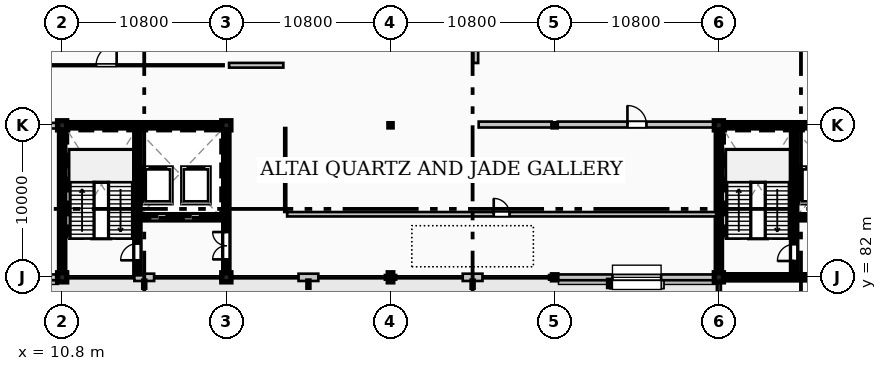
"""IFC4 building model, lengths in metres.
Left out: names, types, materials, properties, quantities, classifications, styles, units other than length and angle.
Written with IfcOpenShell. Run it as: python <this file> out.ifc"""

import sys

from ifc_helpers import new_model, si_unit, direction, frame, frame_2d, origin, origin_2d, place, context, subcontext, project, spatial, rectangle, hollow_rectangle, i_section, extrude, element, fill, save


model = new_model("IFC4")
c1 = context("Model", 3, precision=1e-05, world=origin(), true_north=direction((0.0, 1.0)))
c2 = subcontext(c1, "Body", "Model", "MODEL_VIEW")
j1 = project(units=[si_unit("LENGTHUNIT", "METRE"), si_unit("PLANEANGLEUNIT", "RADIAN")], contexts=[c1])
p1 = place(None, origin())
s1 = spatial("IfcSite", under=j1, at=p1, CompositionType="ELEMENT")
p2 = place(p1, origin())
s2 = spatial("IfcBuilding", under=s1, at=p2, CompositionType="ELEMENT")
p3 = place(p2, frame((0.0, 0.0, 24.0)))
s3 = spatial("IfcBuildingStorey", under=s2, at=p3, CompositionType="ELEMENT", Elevation=24.0)
for number, where, z_axis, x_axis in (
    (1, (10.8, 82.0, 0.0), (0.0, 0.0, 1.0), (1.0, 0.0, 0.0)),
    (2, (10.8, 92.0, 0.0), (0.0, 0.0, 1.0), (1.0, 0.0, 0.0)),
    (3, (21.6, 82.0, 0.0), (0.0, 0.0, 1.0), (1.0, 0.0, 0.0)),
    (4, (21.6, 92.0, 0.0), (0.0, 0.0, 1.0), (1.0, 0.0, 0.0)),
):
    element("IfcColumn", number, at=place(p3, frame(where, z_axis=z_axis, x_axis=x_axis)), inside=s3, PredefinedType="COLUMN", context=c2, shape_type="SweptSolid", body=[
        extrude(rectangle(XDim=0.6, YDim=0.6, at=origin_2d()), origin(), (0.0, 0.0, 1.0), 4.8),
    ])
p4 = place(p3, frame((32.4, 82.0, 0.0), z_axis=(0.0, 0.0, 1.0), x_axis=(1.0, 0.0, 0.0)))
e5 = element("IfcColumn", 5, at=p4, inside=s3, PredefinedType="COLUMN", context=c2, shape_type="SweptSolid", body=[
    extrude(i_section(OverallWidth=0.3, OverallDepth=0.6, WebThickness=0.015, FlangeThickness=0.03, FilletRadius=0.027, at=origin_2d()), origin(), (0.0, 0.0, 1.0), 4.8),
])
p5 = place(p3, frame((32.4, 92.0, 0.0), z_axis=(0.0, 0.0, 1.0), x_axis=(1.0, 0.0, 0.0)))
e6 = element("IfcColumn", 6, at=p5, inside=s3, PredefinedType="COLUMN", context=c2, shape_type="SweptSolid", body=[
    extrude(hollow_rectangle(XDim=0.22, YDim=0.22, WallThickness=0.012, InnerFilletRadius=0.012, OuterFilletRadius=0.025, at=origin_2d()), origin(), (0.0, 0.0, 1.0), 4.8),
])
p6 = place(p3, frame((43.2, 82.0, 0.0), z_axis=(0.0, 0.0, 1.0), x_axis=(1.0, 0.0, 0.0)))
e7 = element("IfcColumn", 7, at=p6, inside=s3, PredefinedType="COLUMN", context=c2, shape_type="SweptSolid", body=[
    extrude(i_section(OverallWidth=0.3, OverallDepth=0.34, WebThickness=0.012, FlangeThickness=0.021, FilletRadius=0.027, at=origin_2d()), origin(), (0.0, 0.0, 1.0), 4.8),
])
p7 = place(p3, frame((43.2, 92.0, 0.0), z_axis=(0.0, 0.0, 1.0), x_axis=(1.0, 0.0, 0.0)))
e8 = element("IfcColumn", 8, at=p7, inside=s3, PredefinedType="COLUMN", context=c2, shape_type="SweptSolid", body=[
    extrude(hollow_rectangle(XDim=0.22, YDim=0.22, WallThickness=0.012, InnerFilletRadius=0.012, OuterFilletRadius=0.025, at=origin_2d()), origin(), (0.0, 0.0, 1.0), 4.8),
])
for number, where, z_axis, x_axis in (
    (9, (54.0, 82.0, 0.0), (0.0, 0.0, 1.0), (1.0, 0.0, 0.0)),
    (10, (54.0, 92.0, 0.0), (0.0, 0.0, 1.0), (1.0, 0.0, 0.0)),
):
    element("IfcColumn", number, at=place(p3, frame(where, z_axis=z_axis, x_axis=x_axis)), inside=s3, PredefinedType="COLUMN", context=c2, shape_type="SweptSolid", body=[
        extrude(rectangle(XDim=0.6, YDim=0.6, at=origin_2d()), origin(), (0.0, 0.0, 1.0), 4.8),
    ])
p8 = place(p3, frame((0.145, 82.0, 0.0), z_axis=(0.0, 0.0, 1.0), x_axis=(1.0, 0.0, 0.0)))
e11 = element("IfcWall", 11, at=p8, inside=s3, PredefinedType="STANDARD", context=c2, shape_type="SweptSolid", body=[
    extrude(rectangle(XDim=10.51, YDim=0.38, at=frame_2d((5.255, 0.0))), origin(), (0.0, 0.0, 1.0), 4.17),
])
p9 = place(p8, frame((3.805, 0.0, 1.0)))
e12 = element("IfcOpeningElement", 12, at=p9, cuts=e11, PredefinedType="OPENING", context=c2, shape_type="SweptSolid", body=[
    extrude(rectangle(XDim=2.9, YDim=2.5, at=frame_2d((1.45, 1.25))), frame((0.0, 0.2, 0.0), z_axis=(0.0, -1.0, 0.0), x_axis=(1.0, 0.0, 0.0)), (0.0, 0.0, 1.0), 0.4),
])
p10 = place(p3, frame((15.55, 82.0, 0.0), z_axis=(0.0, 0.0, 1.0), x_axis=(1.0, 0.0, 0.0)))
e13 = element("IfcWall", 13, at=p10, inside=s3, PredefinedType="STANDARD", context=c2, shape_type="SweptSolid", body=[
    extrude(rectangle(XDim=1.3, YDim=0.48, at=frame_2d((0.65, 0.0))), origin(), (0.0, 0.0, 1.0), 4.17),
])
p11 = place(p3, frame((10.945, 82.0, 0.0), z_axis=(0.0, 0.0, 1.0), x_axis=(1.0, 0.0, 0.0)))
e14 = element("IfcWall", 14, at=p11, inside=s3, PredefinedType="STANDARD", context=c2, shape_type="SweptSolid", body=[
    extrude(rectangle(XDim=0.225, YDim=0.3, at=frame_2d((0.112, 0.0))), origin(), (0.0, 0.0, 1.0), 4.56),
])
p12 = place(p3, frame((21.23, 82.0, 0.0), z_axis=(0.0, 0.0, 1.0), x_axis=(1.0, 0.0, 0.0)))
e15 = element("IfcWall", 15, at=p12, inside=s3, PredefinedType="STANDARD", context=c2, shape_type="SweptSolid", body=[
    extrude(rectangle(XDim=0.225, YDim=0.3, at=frame_2d((0.113, 0.0))), origin(), (0.0, 0.0, 1.0), 4.56),
])
p13 = place(p3, frame((26.35, 82.0, 0.0), z_axis=(0.0, 0.0, 1.0), x_axis=(1.0, 0.0, 0.0)))
e16 = element("IfcWall", 16, at=p13, inside=s3, PredefinedType="STANDARD", context=c2, shape_type="SweptSolid", body=[
    extrude(rectangle(XDim=1.3, YDim=0.48, at=frame_2d((0.65, 0.0))), origin(), (0.0, 0.0, 1.0), 4.17),
])
for number, where, z_axis, x_axis in (
    (17, (21.745, 82.0, 0.0), (0.0, 0.0, 1.0), (1.0, 0.0, 0.0)),
    (18, (32.03, 82.0, 0.0), (0.0, 0.0, 1.0), (1.0, 0.0, 0.0)),
):
    element("IfcWall", number, at=place(p3, frame(where, z_axis=z_axis, x_axis=x_axis)), inside=s3, PredefinedType="STANDARD", context=c2, shape_type="SweptSolid", body=[
        extrude(rectangle(XDim=0.225, YDim=0.3, at=frame_2d((0.112, 0.0))), origin(), (0.0, 0.0, 1.0), 4.56),
    ])
p14 = place(p3, frame((37.15, 82.0, 0.0), z_axis=(0.0, 0.0, 1.0), x_axis=(1.0, 0.0, 0.0)))
e19 = element("IfcWall", 19, at=p14, inside=s3, PredefinedType="STANDARD", context=c2, shape_type="SweptSolid", body=[
    extrude(rectangle(XDim=1.3, YDim=0.48, at=frame_2d((0.65, 0.0))), origin(), (0.0, 0.0, 1.0), 4.17),
])
p15 = place(p3, frame((32.545, 82.0, 0.0), z_axis=(0.0, 0.0, 1.0), x_axis=(1.0, 0.0, 0.0)))
e20 = element("IfcWall", 20, at=p15, inside=s3, PredefinedType="STANDARD", context=c2, shape_type="SweptSolid", body=[
    extrude(rectangle(XDim=0.225, YDim=0.3, at=frame_2d((0.113, 0.0))), origin(), (0.0, 0.0, 1.0), 4.56),
])
p16 = place(p3, frame((42.83, 82.0, 0.0), z_axis=(0.0, 0.0, 1.0), x_axis=(1.0, 0.0, 0.0)))
e21 = element("IfcWall", 21, at=p16, inside=s3, PredefinedType="STANDARD", context=c2, shape_type="SweptSolid", body=[
    extrude(rectangle(XDim=0.225, YDim=0.3, at=frame_2d((0.112, 0.0))), origin(), (0.0, 0.0, 1.0), 4.56),
])
p17 = place(p3, frame((43.345, 82.0, 0.0), z_axis=(0.0, 0.0, 1.0), x_axis=(1.0, 0.0, 0.0)))
e22 = element("IfcWall", 22, at=p17, inside=s3, PredefinedType="STANDARD", context=c2, shape_type="SweptSolid", body=[
    extrude(rectangle(XDim=10.51, YDim=0.38, at=frame_2d((5.255, 0.0))), origin(), (0.0, 0.0, 1.0), 4.17),
])
p18 = place(p17, frame((3.655, 0.0, 1.0)))
e23 = element("IfcOpeningElement", 23, at=p18, cuts=e22, PredefinedType="OPENING", context=c2, shape_type="SweptSolid", body=[
    extrude(rectangle(XDim=3.2, YDim=2.5, at=frame_2d((1.6, 1.25))), frame((0.0, 0.2, 0.0), z_axis=(0.0, -1.0, 0.0), x_axis=(1.0, 0.0, 0.0)), (0.0, 0.0, 1.0), 0.4),
])
p19 = place(p3, frame((54.0, 81.855, 0.0), z_axis=(0.0, 0.0, 1.0), x_axis=(0.0, -1.0, 0.0)))
e24 = element("IfcWall", 24, at=p19, inside=s3, PredefinedType="STANDARD", context=c2, shape_type="SweptSolid", body=[
    extrude(rectangle(XDim=0.225, YDim=0.3, at=frame_2d((0.113, 0.0))), origin(), (0.0, 0.0, 1.0), 4.56),
])
p20 = place(p3, frame((54.0, 40.35, 4.6), z_axis=(0.0, 0.0, 1.0), x_axis=(0.0, 1.0, 0.0)))
e25 = element("IfcWall", 25, at=p20, inside=s3, PredefinedType="PARAPET", context=c2, shape_type="SweptSolid", body=[
    extrude(rectangle(XDim=41.3, YDim=0.26, at=frame_2d((20.65, 0.0))), origin(), (0.0, 0.0, 1.0), 0.55),
])
p21 = place(p3, frame((11.1, 92.0, 0.0), z_axis=(0.0, 0.0, 1.0), x_axis=(1.0, 0.0, 0.0)))
e26 = element("IfcWall", 26, at=p21, inside=s3, PredefinedType="SHEAR", context=c2, shape_type="SweptSolid", body=[
    extrude(rectangle(XDim=10.2, YDim=0.35, at=frame_2d((5.1, 0.0))), origin(), (0.0, 0.0, 1.0), 4.56),
])
p22 = place(p3, frame((10.8, 82.3, 0.0), z_axis=(0.0, 0.0, 1.0), x_axis=(0.0, 1.0, 0.0)))
e27 = element("IfcWall", 27, at=p22, inside=s3, PredefinedType="SHEAR", context=c2, shape_type="SweptSolid", body=[
    extrude(rectangle(XDim=9.4, YDim=0.35, at=frame_2d((4.7, 0.0))), origin(), (0.0, 0.0, 1.0), 4.56),
])
p23 = place(p3, frame((21.6, 82.3, 0.0), z_axis=(0.0, 0.0, 1.0), x_axis=(0.0, 1.0, 0.0)))
e28 = element("IfcWall", 28, at=p23, inside=s3, PredefinedType="SHEAR", context=c2, shape_type="SweptSolid", body=[
    extrude(rectangle(XDim=9.4, YDim=0.35, at=frame_2d((4.7, 0.0))), origin(), (0.0, 0.0, 1.0), 4.56),
])
p24 = place(p23, frame((0.88, 0.0, 0.0)))
e29 = element("IfcOpeningElement", 29, at=p24, cuts=e28, PredefinedType="OPENING", context=c2, shape_type="SweptSolid", body=[
    extrude(rectangle(XDim=1.8, YDim=2.25, at=frame_2d((0.9, 1.125))), frame((0.0, 0.185, 0.0), z_axis=(0.0, -1.0, 0.0), x_axis=(1.0, 0.0, 0.0)), (0.0, 0.0, 1.0), 0.37),
])
p25 = place(p3, frame((15.75, 82.22, 0.0), z_axis=(0.0, 0.0, 1.0), x_axis=(0.0, 1.0, 0.0)))
e30 = element("IfcWall", 30, at=p25, inside=s3, PredefinedType="SHEAR", context=c2, shape_type="SweptSolid", body=[
    extrude(rectangle(XDim=9.605, YDim=0.35, at=frame_2d((4.802, 0.0))), origin(), (0.0, 0.0, 1.0), 4.56),
])
p26 = place(p25, frame((0.9, 0.0, 0.0)))
e31 = element("IfcOpeningElement", 31, at=p26, cuts=e30, PredefinedType="OPENING", context=c2, shape_type="SweptSolid", body=[
    extrude(rectangle(XDim=1.1, YDim=2.2, at=frame_2d((0.55, 1.1))), frame((0.0, 0.185, 0.0), z_axis=(0.0, -1.0, 0.0), x_axis=(1.0, 0.0, 0.0)), (0.0, 0.0, 1.0), 0.37),
])
p27 = place(p3, frame((15.93, 85.95, 0.0), z_axis=(0.0, 0.0, 1.0), x_axis=(1.0, 0.0, 0.0)))
e32 = element("IfcWall", 32, at=p27, inside=s3, PredefinedType="SHEAR", context=c2, shape_type="SweptSolid", body=[
    extrude(rectangle(XDim=5.49, YDim=0.35, at=frame_2d((2.745, 0.0))), origin(), (0.0, 0.0, 1.0), 4.56),
])
p28 = place(p27, frame((0.65, 0.0, 0.0)))
e33 = element("IfcOpeningElement", 33, at=p28, cuts=e32, PredefinedType="OPENING", context=c2, shape_type="SweptSolid", body=[
    extrude(rectangle(XDim=1.1, YDim=2.2, at=frame_2d((0.55, 1.1))), frame((0.0, 0.185, 0.0), z_axis=(0.0, -1.0, 0.0), x_axis=(1.0, 0.0, 0.0)), (0.0, 0.0, 1.0), 0.37),
])
p29 = place(p27, frame((2.85, 0.0, 0.0)))
e34 = element("IfcOpeningElement", 34, at=p29, cuts=e32, PredefinedType="OPENING", context=c2, shape_type="SweptSolid", body=[
    extrude(rectangle(XDim=1.1, YDim=2.2, at=frame_2d((0.55, 1.1))), frame((0.0, 0.185, 0.0), z_axis=(0.0, -1.0, 0.0), x_axis=(1.0, 0.0, 0.0)), (0.0, 0.0, 1.0), 0.37),
])
for number, where, z_axis, x_axis in (
    (35, (54.3, 82.0, 0.0), (0.0, 0.0, 1.0), (1.0, 0.0, 0.0)),
    (36, (54.3, 92.0, 0.0), (0.0, 0.0, 1.0), (1.0, 0.0, 0.0)),
):
    element("IfcWall", number, at=place(p3, frame(where, z_axis=z_axis, x_axis=x_axis)), inside=s3, PredefinedType="SHEAR", context=c2, shape_type="SweptSolid", body=[
        extrude(rectangle(XDim=10.2, YDim=0.35, at=frame_2d((5.1, 0.0))), origin(), (0.0, 0.0, 1.0), 4.56),
    ])
p30 = place(p3, frame((54.0, 82.3, 0.0), z_axis=(0.0, 0.0, 1.0), x_axis=(0.0, 1.0, 0.0)))
e37 = element("IfcWall", 37, at=p30, inside=s3, PredefinedType="SHEAR", context=c2, shape_type="SweptSolid", body=[
    extrude(rectangle(XDim=9.4, YDim=0.35, at=frame_2d((4.7, 0.0))), origin(), (0.0, 0.0, 1.0), 4.56),
])
p31 = place(p3, frame((58.95, 82.175, 0.0), z_axis=(0.0, 0.0, 1.0), x_axis=(0.0, 1.0, 0.0)))
e38 = element("IfcWall", 38, at=p31, inside=s3, PredefinedType="SHEAR", context=c2, shape_type="SweptSolid", body=[
    extrude(rectangle(XDim=9.65, YDim=0.35, at=frame_2d((4.825, 0.0))), origin(), (0.0, 0.0, 1.0), 4.56),
])
p32 = place(p31, frame((0.9, 0.0, 0.0)))
e39 = element("IfcOpeningElement", 39, at=p32, cuts=e38, PredefinedType="OPENING", context=c2, shape_type="SweptSolid", body=[
    extrude(rectangle(XDim=1.1, YDim=2.2, at=frame_2d((0.55, 1.1))), frame((0.0, 0.185, 0.0), z_axis=(0.0, -1.0, 0.0), x_axis=(1.0, 0.0, 0.0)), (0.0, 0.0, 1.0), 0.37),
])
p33 = place(p3, frame((59.13, 85.95, 0.0), z_axis=(0.0, 0.0, 1.0), x_axis=(1.0, 0.0, 0.0)))
e40 = element("IfcWall", 40, at=p33, inside=s3, PredefinedType="SHEAR", context=c2, shape_type="SweptSolid", body=[
    extrude(rectangle(XDim=5.49, YDim=0.35, at=frame_2d((2.745, 0.0))), origin(), (0.0, 0.0, 1.0), 4.56),
])
p34 = place(p33, frame((0.65, 0.0, 0.0)))
e41 = element("IfcOpeningElement", 41, at=p34, cuts=e40, PredefinedType="OPENING", context=c2, shape_type="SweptSolid", body=[
    extrude(rectangle(XDim=1.1, YDim=2.2, at=frame_2d((0.55, 1.1))), frame((0.0, 0.185, 0.0), z_axis=(0.0, -1.0, 0.0), x_axis=(1.0, 0.0, 0.0)), (0.0, 0.0, 1.0), 0.37),
])
p35 = place(p33, frame((2.85, 0.0, 0.0)))
e42 = element("IfcOpeningElement", 42, at=p35, cuts=e40, PredefinedType="OPENING", context=c2, shape_type="SweptSolid", body=[
    extrude(rectangle(XDim=2.0, YDim=2.5, at=frame_2d((1.0, 1.25))), frame((0.0, 0.185, 0.0), z_axis=(0.0, -1.0, 0.0), x_axis=(1.0, 0.0, 0.0)), (0.0, 0.0, 1.0), 0.37),
])
p36 = place(p3, frame((25.6, 86.15, 0.0), z_axis=(0.0, 0.0, 1.0), x_axis=(1.0, 0.0, 0.0)))
e43 = element("IfcWall", 43, at=p36, inside=s3, PredefinedType="PARTITIONING", context=c2, shape_type="SweptSolid", body=[
    extrude(rectangle(XDim=28.22, YDim=0.29, at=frame_2d((14.11, 0.0))), origin(), (0.0, 0.0, 1.0), 4.52),
])
p37 = place(p36, frame((13.59, 0.0, 0.0)))
e44 = element("IfcOpeningElement", 44, at=p37, cuts=e43, PredefinedType="OPENING", context=c2, shape_type="SweptSolid", body=[
    extrude(rectangle(XDim=1.04, YDim=2.2, at=frame_2d((0.52, 1.1))), frame((0.0, 0.155, 0.0), z_axis=(0.0, -1.0, 0.0), x_axis=(1.0, 0.0, 0.0)), (0.0, 0.0, 1.0), 0.31),
])
p38 = place(p3, frame((6.0, 91.975, 0.0), z_axis=(0.0, 0.0, 1.0), x_axis=(1.0, 0.0, 0.0)))
e45 = element("IfcWall", 45, at=p38, inside=s3, PredefinedType="PARTITIONING", context=c2, shape_type="SweptSolid", body=[
    extrude(rectangle(XDim=4.62, YDim=0.37, at=frame_2d((2.31, 0.0))), origin(), (0.0, 0.0, 1.0), 4.17),
])
p39 = place(p38, frame((1.735, 0.0, 0.0)))
e46 = element("IfcOpeningElement", 46, at=p39, cuts=e45, PredefinedType="OPENING", context=c2, shape_type="SweptSolid", body=[
    extrude(rectangle(XDim=1.15, YDim=2.25, at=frame_2d((0.575, 1.125))), frame((0.0, 0.195, 0.0), z_axis=(0.0, -1.0, 0.0), x_axis=(1.0, 0.0, 0.0)), (0.0, 0.0, 1.0), 0.39),
])
p40 = place(p3, frame((38.2, 92.05, 0.0), z_axis=(0.0, 0.0, 1.0), x_axis=(1.0, 0.0, 0.0)))
e47 = element("IfcWall", 47, at=p40, inside=s3, PredefinedType="PARTITIONING", context=c2, shape_type="SweptSolid", body=[
    extrude(rectangle(XDim=4.8, YDim=0.39, at=frame_2d((2.4, 0.0))), origin(), (0.0, 0.0, 1.0), 4.17),
])
p41 = place(p3, frame((43.4, 92.05, 0.0), z_axis=(0.0, 0.0, 1.0), x_axis=(1.0, 0.0, 0.0)))
e48 = element("IfcWall", 48, at=p41, inside=s3, PredefinedType="PARTITIONING", context=c2, shape_type="SweptSolid", body=[
    extrude(rectangle(XDim=10.42, YDim=0.39, at=frame_2d((5.21, 0.0))), origin(), (0.0, 0.0, 1.0), 4.17),
])
p42 = place(p41, frame((4.585, 0.0, 0.0)))
e49 = element("IfcOpeningElement", 49, at=p42, cuts=e48, PredefinedType="OPENING", context=c2, shape_type="SweptSolid", body=[
    extrude(rectangle(XDim=1.25, YDim=2.3, at=frame_2d((0.625, 1.15))), frame((0.0, 0.205, 0.0), z_axis=(0.0, -1.0, 0.0), x_axis=(1.0, 0.0, 0.0)), (0.0, 0.0, 1.0), 0.41),
])
p43 = place(p3, frame((6.0, 95.95, 0.0), z_axis=(0.0, 0.0, 1.0), x_axis=(1.0, 0.0, 0.0)))
e50 = element("IfcWall", 50, at=p43, inside=s3, PredefinedType="PARTITIONING", context=c2, shape_type="SweptSolid", body=[
    extrude(rectangle(XDim=15.42, YDim=0.11, at=frame_2d((7.71, 0.0))), origin(), (0.0, 0.0, 1.0), 4.52),
])
p44 = place(p43, frame((7.035, 0.0, 0.0)))
e51 = element("IfcOpeningElement", 51, at=p44, cuts=e50, PredefinedType="OPENING", context=c2, shape_type="SweptSolid", body=[
    extrude(rectangle(XDim=1.35, YDim=2.35, at=frame_2d((0.675, 1.175))), frame((0.0, 0.065, 0.0), z_axis=(0.0, -1.0, 0.0), x_axis=(1.0, 0.0, 0.0)), (0.0, 0.0, 1.0), 0.13),
])
p45 = place(p3, frame((25.475, 86.3, 0.0), z_axis=(0.0, 0.0, 1.0), x_axis=(0.0, 1.0, 0.0)))
e52 = element("IfcWall", 52, at=p45, inside=s3, PredefinedType="PARTITIONING", context=c2, shape_type="SweptSolid", body=[
    extrude(rectangle(XDim=5.52, YDim=0.13, at=frame_2d((2.76, 0.0))), origin(), (0.0, 0.0, 1.0), 4.52),
])
p46 = place(p45, frame((2.035, 0.0, 0.0)))
e53 = element("IfcOpeningElement", 53, at=p46, cuts=e52, PredefinedType="OPENING", context=c2, shape_type="SweptSolid", body=[
    extrude(rectangle(XDim=1.45, YDim=2.35, at=frame_2d((0.725, 1.175))), frame((0.0, 0.075, 0.0), z_axis=(0.0, -1.0, 0.0), x_axis=(1.0, 0.0, 0.0)), (0.0, 0.0, 1.0), 0.15),
])
p47 = place(p3, frame((21.78, 95.95, 0.0), z_axis=(0.0, 0.0, 1.0), x_axis=(1.0, 0.0, 0.0)))
e54 = element("IfcWall", 54, at=p47, inside=s3, PredefinedType="PARTITIONING", context=c2, shape_type="SweptSolid", body=[
    extrude(rectangle(XDim=3.57, YDim=0.31, at=frame_2d((1.785, 0.0))), origin(), (0.0, 0.0, 1.0), 4.52),
])
p48 = place(p3, frame((38.0, 96.1, 0.0), z_axis=(0.0, 0.0, 1.0), x_axis=(0.0, 1.0, 0.0)))
e55 = element("IfcWall", 55, at=p48, inside=s3, PredefinedType="PARTITIONING", context=c2, shape_type="SweptSolid", body=[
    extrude(rectangle(XDim=15.72, YDim=0.33, at=frame_2d((7.86, 0.0))), origin(), (0.0, 0.0, 1.0), 4.52),
])
p49 = place(p18, origin())
e56 = element("IfcWindow", 56, at=p49, inside=s3, PartitioningType="SINGLE_PANEL", PredefinedType="WINDOW", context=c2, shape_type="SweptSolid", body=[
    extrude(rectangle(XDim=3.2, YDim=2.5, at=frame_2d((1.6, 1.25))), frame((0.0, 0.03, 0.0), z_axis=(0.0, -1.0, 0.0), x_axis=(1.0, 0.0, 0.0)), (0.0, 0.0, 1.0), 0.06),
])
fill(e23, e56)
p50 = place(p26, origin())
e57 = element("IfcDoor", 57, at=p50, inside=s3, OperationType="SINGLE_SWING_LEFT", PredefinedType="DOOR", context=c2, shape_type="SweptSolid", body=[
    extrude(rectangle(XDim=1.1, YDim=2.2, at=frame_2d((0.55, 1.1))), frame((0.0, 0.025, 0.0), z_axis=(0.0, -1.0, 0.0), x_axis=(1.0, 0.0, 0.0)), (0.0, 0.0, 1.0), 0.05),
])
fill(e31, e57)
p51 = place(p24, origin())
e58 = element("IfcDoor", 58, at=p51, inside=s3, OperationType="DOUBLE_DOOR_SINGLE_SWING", PredefinedType="DOOR", context=c2, shape_type="SweptSolid", body=[
    extrude(rectangle(XDim=1.8, YDim=2.25, at=frame_2d((0.9, 1.125))), frame((0.0, 0.025, 0.0), z_axis=(0.0, -1.0, 0.0), x_axis=(1.0, 0.0, 0.0)), (0.0, 0.0, 1.0), 0.05),
])
fill(e29, e58)
p52 = place(p28, origin())
e59 = element("IfcDoor", 59, at=p52, inside=s3, OperationType="DOUBLE_DOOR_SLIDING", PredefinedType="DOOR", context=c2, shape_type="SweptSolid", body=[
    extrude(rectangle(XDim=1.1, YDim=2.2, at=frame_2d((0.55, 1.1))), frame((0.0, 0.025, 0.0), z_axis=(0.0, -1.0, 0.0), x_axis=(1.0, 0.0, 0.0)), (0.0, 0.0, 1.0), 0.05),
])
fill(e33, e59)
p53 = place(p29, origin())
e60 = element("IfcDoor", 60, at=p53, inside=s3, OperationType="DOUBLE_DOOR_SLIDING", PredefinedType="DOOR", context=c2, shape_type="SweptSolid", body=[
    extrude(rectangle(XDim=1.1, YDim=2.2, at=frame_2d((0.55, 1.1))), frame((0.0, 0.025, 0.0), z_axis=(0.0, -1.0, 0.0), x_axis=(1.0, 0.0, 0.0)), (0.0, 0.0, 1.0), 0.05),
])
fill(e34, e60)
p54 = place(p32, origin())
e61 = element("IfcDoor", 61, at=p54, inside=s3, OperationType="SINGLE_SWING_LEFT", PredefinedType="DOOR", context=c2, shape_type="SweptSolid", body=[
    extrude(rectangle(XDim=1.1, YDim=2.2, at=frame_2d((0.55, 1.1))), frame((0.0, 0.025, 0.0), z_axis=(0.0, -1.0, 0.0), x_axis=(1.0, 0.0, 0.0)), (0.0, 0.0, 1.0), 0.05),
])
fill(e39, e61)
p55 = place(p34, origin())
e62 = element("IfcDoor", 62, at=p55, inside=s3, OperationType="DOUBLE_DOOR_SLIDING", PredefinedType="DOOR", context=c2, shape_type="SweptSolid", body=[
    extrude(rectangle(XDim=1.1, YDim=2.2, at=frame_2d((0.55, 1.1))), frame((0.0, 0.025, 0.0), z_axis=(0.0, -1.0, 0.0), x_axis=(1.0, 0.0, 0.0)), (0.0, 0.0, 1.0), 0.05),
])
fill(e41, e62)
p56 = place(p37, origin())
e63 = element("IfcDoor", 63, at=p56, inside=s3, OperationType="SINGLE_SWING_LEFT", PredefinedType="DOOR", context=c2, shape_type="SweptSolid", body=[
    extrude(rectangle(XDim=1.04, YDim=2.2, at=frame_2d((0.52, 1.1))), frame((0.0, 0.025, 0.0), z_axis=(0.0, -1.0, 0.0), x_axis=(1.0, 0.0, 0.0)), (0.0, 0.0, 1.0), 0.05),
])
fill(e44, e63)
p57 = place(p42, origin())
e64 = element("IfcDoor", 64, at=p57, inside=s3, OperationType="SINGLE_SWING_LEFT", PredefinedType="DOOR", context=c2, shape_type="SweptSolid", body=[
    extrude(rectangle(XDim=1.25, YDim=2.3, at=frame_2d((0.625, 1.15))), frame((0.0, 0.025, 0.0), z_axis=(0.0, -1.0, 0.0), x_axis=(1.0, 0.0, 0.0)), (0.0, 0.0, 1.0), 0.05),
])
fill(e49, e64)
p58 = place(p44, origin())
e65 = element("IfcDoor", 65, at=p58, inside=s3, OperationType="SINGLE_SWING_RIGHT", PredefinedType="DOOR", context=c2, shape_type="SweptSolid", body=[
    extrude(rectangle(XDim=1.35, YDim=2.35, at=frame_2d((0.675, 1.175))), frame((0.0, 0.025, 0.0), z_axis=(0.0, -1.0, 0.0), x_axis=(1.0, 0.0, 0.0)), (0.0, 0.0, 1.0), 0.05),
])
fill(e51, e65)
p59 = place(p46, origin())
e66 = element("IfcDoor", 66, at=p59, inside=s3, OperationType="SINGLE_SWING_LEFT", PredefinedType="DOOR", context=c2, shape_type="SweptSolid", body=[
    extrude(rectangle(XDim=1.45, YDim=2.35, at=frame_2d((0.725, 1.175))), frame((0.0, 0.025, 0.0), z_axis=(0.0, -1.0, 0.0), x_axis=(1.0, 0.0, 0.0)), (0.0, 0.0, 1.0), 0.05),
])
fill(e53, e66)
save(model, sys.argv[1])
